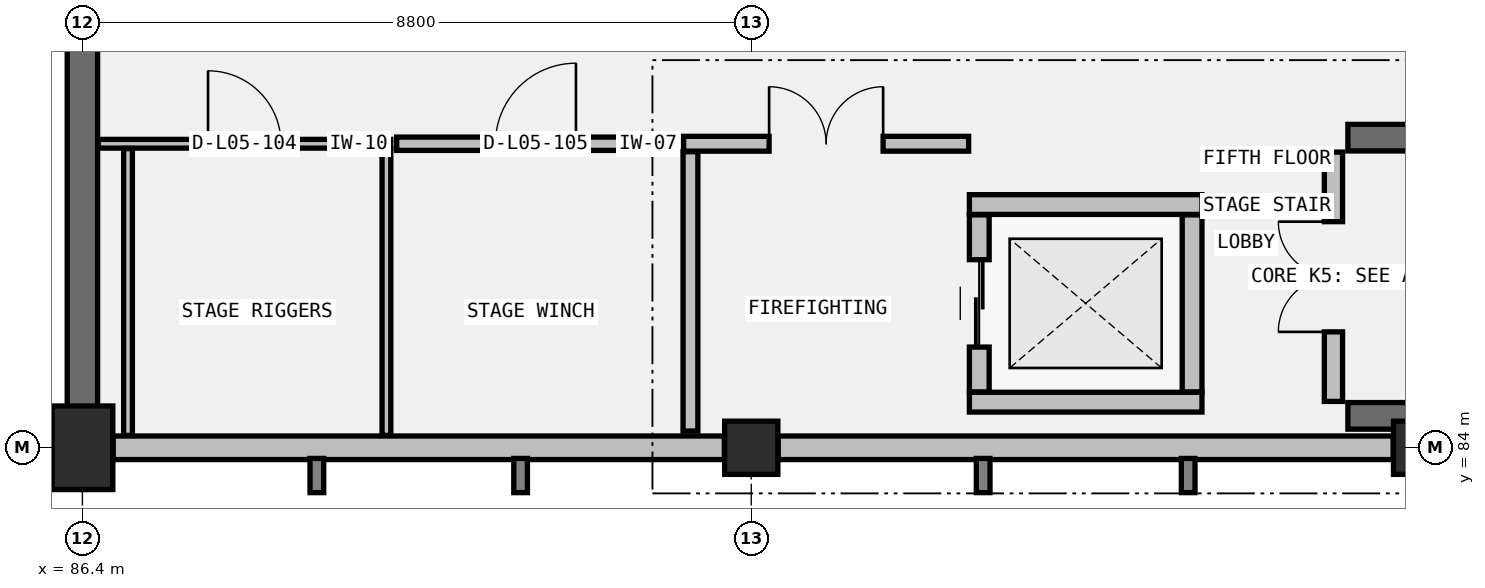
"""IFC4 building model, lengths in metres.
Left out: names, types, materials, properties, quantities, classifications, styles, units other than length and angle.
Written with IfcOpenShell. Run it as: python <this file> out.ifc"""

import sys

from ifc_helpers import new_model, si_unit, direction, frame, frame_2d, origin, origin_2d, place, context, subcontext, project, spatial, rectangle, extrude, element, fill, save


model = new_model("IFC4")
c1 = context("Model", 3, precision=1e-05, world=origin(), true_north=direction((0.0, 1.0)))
c2 = subcontext(c1, "Body", "Model", "MODEL_VIEW")
j1 = project(units=[si_unit("LENGTHUNIT", "METRE"), si_unit("PLANEANGLEUNIT", "RADIAN")], contexts=[c1])
p1 = place(None, origin())
s1 = spatial("IfcSite", under=j1, at=p1, CompositionType="ELEMENT")
p2 = place(p1, origin())
s2 = spatial("IfcBuilding", under=s1, at=p2, CompositionType="ELEMENT")
p3 = place(p2, frame((0.0, 0.0, 23.8)))
s3 = spatial("IfcBuildingStorey", under=s2, at=p3, CompositionType="ELEMENT", Elevation=23.8)
p4 = place(p3, frame((86.4, 84.0, 0.0), z_axis=(0.0, 0.0, 1.0), x_axis=(1.0, 0.0, 0.0)))
e1 = element("IfcColumn", 1, at=p4, inside=s3, PredefinedType="COLUMN", context=c2, shape_type="SweptSolid", body=[
    extrude(rectangle(XDim=0.8, YDim=1.1, at=origin_2d()), origin(), (0.0, 0.0, 1.0), 4.8),
])
for number, where, z_axis, x_axis in (
    (2, (95.2, 84.0, 0.0), (0.0, 0.0, 1.0), (1.0, 0.0, 0.0)),
    (3, (104.0, 84.0, 0.0), (0.0, 0.0, 1.0), (1.0, 0.0, 0.0)),
):
    element("IfcColumn", number, at=place(p3, frame(where, z_axis=z_axis, x_axis=x_axis)), inside=s3, PredefinedType="COLUMN", context=c2, shape_type="SweptSolid", body=[
        extrude(rectangle(XDim=0.7, YDim=0.7, at=origin_2d()), origin(), (0.0, 0.0, 1.0), 4.8),
    ])
p5 = place(p3, frame((86.4, 84.5, 0.0), z_axis=(0.0, 0.0, 1.0), x_axis=(0.0, 1.0, 0.0)))
e4 = element("IfcWall", 4, at=p5, inside=s3, PredefinedType="SHEAR", context=c2, shape_type="SweptSolid", body=[
    extrude(rectangle(XDim=29.0, YDim=0.4, at=frame_2d((14.5, 0.0))), origin(), (0.0, 0.0, 1.0), 4.8),
])
for number, where, z_axis, x_axis in (
    (5, (103.05, 84.42, 0.0), (0.0, 0.0, 1.0), (1.0, 0.0, 0.0)),
    (6, (111.2, 88.08, 0.0), (0.0, 0.0, 1.0), (-1.0, 0.0, 0.0)),
):
    element("IfcWall", number, at=place(p3, frame(where, z_axis=z_axis, x_axis=x_axis)), inside=s3, PredefinedType="SHEAR", context=c2, shape_type="SweptSolid", body=[
        extrude(rectangle(XDim=8.15, YDim=0.35, at=frame_2d((4.075, 0.0))), origin(), (0.0, 0.0, 1.0), 4.56),
    ])
p6 = place(p3, frame((86.804, 84.0, 0.0), z_axis=(0.0, 0.0, 1.0), x_axis=(1.0, 0.0, 0.0)))
e7 = element("IfcWall", 7, at=p6, inside=s3, PredefinedType="STANDARD", context=c2, shape_type="SweptSolid", body=[
    extrude(rectangle(XDim=8.042, YDim=0.31, at=frame_2d((4.021, 0.0))), origin(), (0.0, 0.0, 1.0), 4.078),
])
p7 = place(p3, frame((95.554, 84.0, 0.0), z_axis=(0.0, 0.0, 1.0), x_axis=(1.0, 0.0, 0.0)))
e8 = element("IfcWall", 8, at=p7, inside=s3, PredefinedType="STANDARD", context=c2, shape_type="SweptSolid", body=[
    extrude(rectangle(XDim=8.092, YDim=0.31, at=frame_2d((4.046, 0.0))), origin(), (0.0, 0.0, 1.0), 4.078),
])
p8 = place(p3, frame((102.86, 84.61, 0.0), z_axis=(0.0, 0.0, 1.0), x_axis=(0.0, 1.0, 0.0)))
e9 = element("IfcWall", 9, at=p8, inside=s3, PredefinedType="STANDARD", context=c2, shape_type="SweptSolid", body=[
    extrude(rectangle(XDim=3.28, YDim=0.24, at=frame_2d((1.64, 0.0))), origin(), (0.0, 0.0, 1.0), 4.56),
])
p9 = place(p8, frame((0.915, 0.0, 0.0)))
e10 = element("IfcOpeningElement", 10, at=p9, cuts=e9, PredefinedType="OPENING", context=c2, shape_type="SweptSolid", body=[
    extrude(rectangle(XDim=1.45, YDim=2.2, at=frame_2d((0.725, 1.1))), frame((0.0, 0.13, 0.0), z_axis=(0.0, -1.0, 0.0), x_axis=(1.0, 0.0, 0.0)), (0.0, 0.0, 1.0), 0.26),
])
for number, where, z_axis, x_axis in (
    (11, (98.07, 84.6, 0.0), (0.0, 0.0, 1.0), (1.0, 0.0, 0.0)),
    (12, (98.07, 87.2, 0.0), (0.0, 0.0, 1.0), (1.0, 0.0, 0.0)),
):
    element("IfcWall", number, at=place(p3, frame(where, z_axis=z_axis, x_axis=x_axis)), inside=s3, PredefinedType="STANDARD", context=c2, shape_type="SweptSolid", body=[
        extrude(rectangle(XDim=3.06, YDim=0.26, at=frame_2d((1.53, 0.0))), origin(), (0.0, 0.0, 1.0), 4.56),
    ])
p10 = place(p3, frame((98.2, 84.736, 0.0), z_axis=(0.0, 0.0, 1.0), x_axis=(0.0, 1.0, 0.0)))
e13 = element("IfcWall", 13, at=p10, inside=s3, PredefinedType="STANDARD", context=c2, shape_type="SweptSolid", body=[
    extrude(rectangle(XDim=2.328, YDim=0.26, at=frame_2d((1.164, 0.0))), origin(), (0.0, 0.0, 1.0), 4.56),
])
p11 = place(p10, frame((0.589, 0.0, 0.0)))
e14 = element("IfcOpeningElement", 14, at=p11, cuts=e13, PredefinedType="OPENING", context=c2, shape_type="SweptSolid", body=[
    extrude(rectangle(XDim=1.15, YDim=2.15, at=frame_2d((0.575, 1.075))), frame((0.0, 0.14, 0.0), z_axis=(0.0, -1.0, 0.0), x_axis=(1.0, 0.0, 0.0)), (0.0, 0.0, 1.0), 0.28),
])
p12 = place(p3, frame((101.0, 84.736, 0.0), z_axis=(0.0, 0.0, 1.0), x_axis=(0.0, 1.0, 0.0)))
e15 = element("IfcWall", 15, at=p12, inside=s3, PredefinedType="STANDARD", context=c2, shape_type="SweptSolid", body=[
    extrude(rectangle(XDim=2.328, YDim=0.26, at=frame_2d((1.164, 0.0))), origin(), (0.0, 0.0, 1.0), 4.56),
])
p13 = place(p3, frame((94.4, 84.22, 0.0), z_axis=(0.0, 0.0, 1.0), x_axis=(0.0, 1.0, 0.0)))
e16 = element("IfcWall", 16, at=p13, inside=s3, PredefinedType="PARTITIONING", context=c2, shape_type="SweptSolid", body=[
    extrude(rectangle(XDim=3.675, YDim=0.195, at=frame_2d((1.837, 0.0))), origin(), (0.0, 0.0, 1.0), 4.078),
])
p14 = place(p3, frame((94.31, 88.0, 0.0), z_axis=(0.0, 0.0, 1.0), x_axis=(1.0, 0.0, 0.0)))
e17 = element("IfcWall", 17, at=p14, inside=s3, PredefinedType="PARTITIONING", context=c2, shape_type="SweptSolid", body=[
    extrude(rectangle(XDim=3.75, YDim=0.195, at=frame_2d((1.875, 0.0))), origin(), (0.0, 0.0, 1.0), 4.56),
])
p15 = place(p14, frame((1.125, 0.0, 0.0)))
e18 = element("IfcOpeningElement", 18, at=p15, cuts=e17, PredefinedType="OPENING", context=c2, shape_type="SweptSolid", body=[
    extrude(rectangle(XDim=1.5, YDim=2.2, at=frame_2d((0.75, 1.1))), frame((0.0, 0.107, 0.0), z_axis=(0.0, -1.0, 0.0), x_axis=(1.0, 0.0, 0.0)), (0.0, 0.0, 1.0), 0.215),
])
p16 = place(p3, frame((86.608, 88.0, 0.0), z_axis=(0.0, 0.0, 1.0), x_axis=(1.0, 0.0, 0.0)))
e19 = element("IfcWall", 19, at=p16, inside=s3, PredefinedType="PARTITIONING", context=c2, shape_type="SweptSolid", body=[
    extrude(rectangle(XDim=3.85, YDim=0.115, at=frame_2d((1.925, 0.0))), origin(), (0.0, 0.0, 1.0), 4.56),
])
p17 = place(p16, frame((1.445, 0.0, 0.0)))
e20 = element("IfcOpeningElement", 20, at=p17, cuts=e19, PredefinedType="OPENING", context=c2, shape_type="SweptSolid", body=[
    extrude(rectangle(XDim=0.96, YDim=2.08, at=frame_2d((0.48, 1.04))), frame((0.0, 0.067, 0.0), z_axis=(0.0, -1.0, 0.0), x_axis=(1.0, 0.0, 0.0)), (0.0, 0.0, 1.0), 0.135),
])
for number, where, z_axis, x_axis in (
    (21, (87.0, 84.163, 0.0), (0.0, 0.0, 1.0), (0.0, 1.0, 0.0)),
    (22, (90.4, 84.163, 0.0), (0.0, 0.0, 1.0), (0.0, 1.0, 0.0)),
):
    element("IfcWall", number, at=place(p3, frame(where, z_axis=z_axis, x_axis=x_axis)), inside=s3, PredefinedType="PARTITIONING", context=c2, shape_type="SweptSolid", body=[
        extrude(rectangle(XDim=3.773, YDim=0.115, at=frame_2d((1.887, 0.0))), origin(), (0.0, 0.0, 1.0), 4.078),
    ])
p18 = place(p3, frame((90.535, 88.0, 0.0), z_axis=(0.0, 0.0, 1.0), x_axis=(1.0, 0.0, 0.0)))
e23 = element("IfcWall", 23, at=p18, inside=s3, PredefinedType="PARTITIONING", context=c2, shape_type="SweptSolid", body=[
    extrude(rectangle(XDim=3.657, YDim=0.175, at=frame_2d((1.829, 0.0))), origin(), (0.0, 0.0, 1.0), 4.56),
])
p19 = place(p18, frame((1.299, 0.0, 0.0)))
e24 = element("IfcOpeningElement", 24, at=p19, cuts=e23, PredefinedType="OPENING", context=c2, shape_type="SweptSolid", body=[
    extrude(rectangle(XDim=1.06, YDim=2.15, at=frame_2d((0.53, 1.075))), frame((0.0, 0.097, 0.0), z_axis=(0.0, -1.0, 0.0), x_axis=(1.0, 0.0, 0.0)), (0.0, 0.0, 1.0), 0.195),
])
p20 = place(p9, origin())
e25 = element("IfcDoor", 25, at=p20, inside=s3, OperationType="DOUBLE_DOOR_SINGLE_SWING", PredefinedType="DOOR", context=c2, shape_type="SweptSolid", body=[
    extrude(rectangle(XDim=1.45, YDim=2.2, at=frame_2d((0.725, 1.1))), frame((0.0, 0.025, 0.0), z_axis=(0.0, -1.0, 0.0), x_axis=(1.0, 0.0, 0.0)), (0.0, 0.0, 1.0), 0.05),
])
fill(e10, e25)
p21 = place(p11, origin())
e26 = element("IfcDoor", 26, at=p21, inside=s3, OperationType="SLIDING_TO_LEFT", PredefinedType="DOOR", context=c2, shape_type="SweptSolid", body=[
    extrude(rectangle(XDim=1.15, YDim=2.15, at=frame_2d((0.575, 1.075))), frame((0.0, 0.025, 0.0), z_axis=(0.0, -1.0, 0.0), x_axis=(1.0, 0.0, 0.0)), (0.0, 0.0, 1.0), 0.05),
])
fill(e14, e26)
p22 = place(p15, origin())
e27 = element("IfcDoor", 27, at=p22, inside=s3, OperationType="DOUBLE_DOOR_SINGLE_SWING", PredefinedType="DOOR", context=c2, shape_type="SweptSolid", body=[
    extrude(rectangle(XDim=1.5, YDim=2.2, at=frame_2d((0.75, 1.1))), frame((0.0, 0.025, 0.0), z_axis=(0.0, -1.0, 0.0), x_axis=(1.0, 0.0, 0.0)), (0.0, 0.0, 1.0), 0.05),
])
fill(e18, e27)
p23 = place(p17, origin())
e28 = element("IfcDoor", 28, at=p23, inside=s3, OperationType="SINGLE_SWING_LEFT", PredefinedType="DOOR", context=c2, shape_type="SweptSolid", body=[
    extrude(rectangle(XDim=0.96, YDim=2.08, at=frame_2d((0.48, 1.04))), frame((0.0, 0.025, 0.0), z_axis=(0.0, -1.0, 0.0), x_axis=(1.0, 0.0, 0.0)), (0.0, 0.0, 1.0), 0.05),
])
fill(e20, e28)
p24 = place(p19, origin())
e29 = element("IfcDoor", 29, at=p24, inside=s3, OperationType="SINGLE_SWING_RIGHT", PredefinedType="DOOR", context=c2, shape_type="SweptSolid", body=[
    extrude(rectangle(XDim=1.06, YDim=2.15, at=frame_2d((0.53, 1.075))), frame((0.0, 0.025, 0.0), z_axis=(0.0, -1.0, 0.0), x_axis=(1.0, 0.0, 0.0)), (0.0, 0.0, 1.0), 0.05),
])
fill(e24, e29)
save(model, sys.argv[1])
